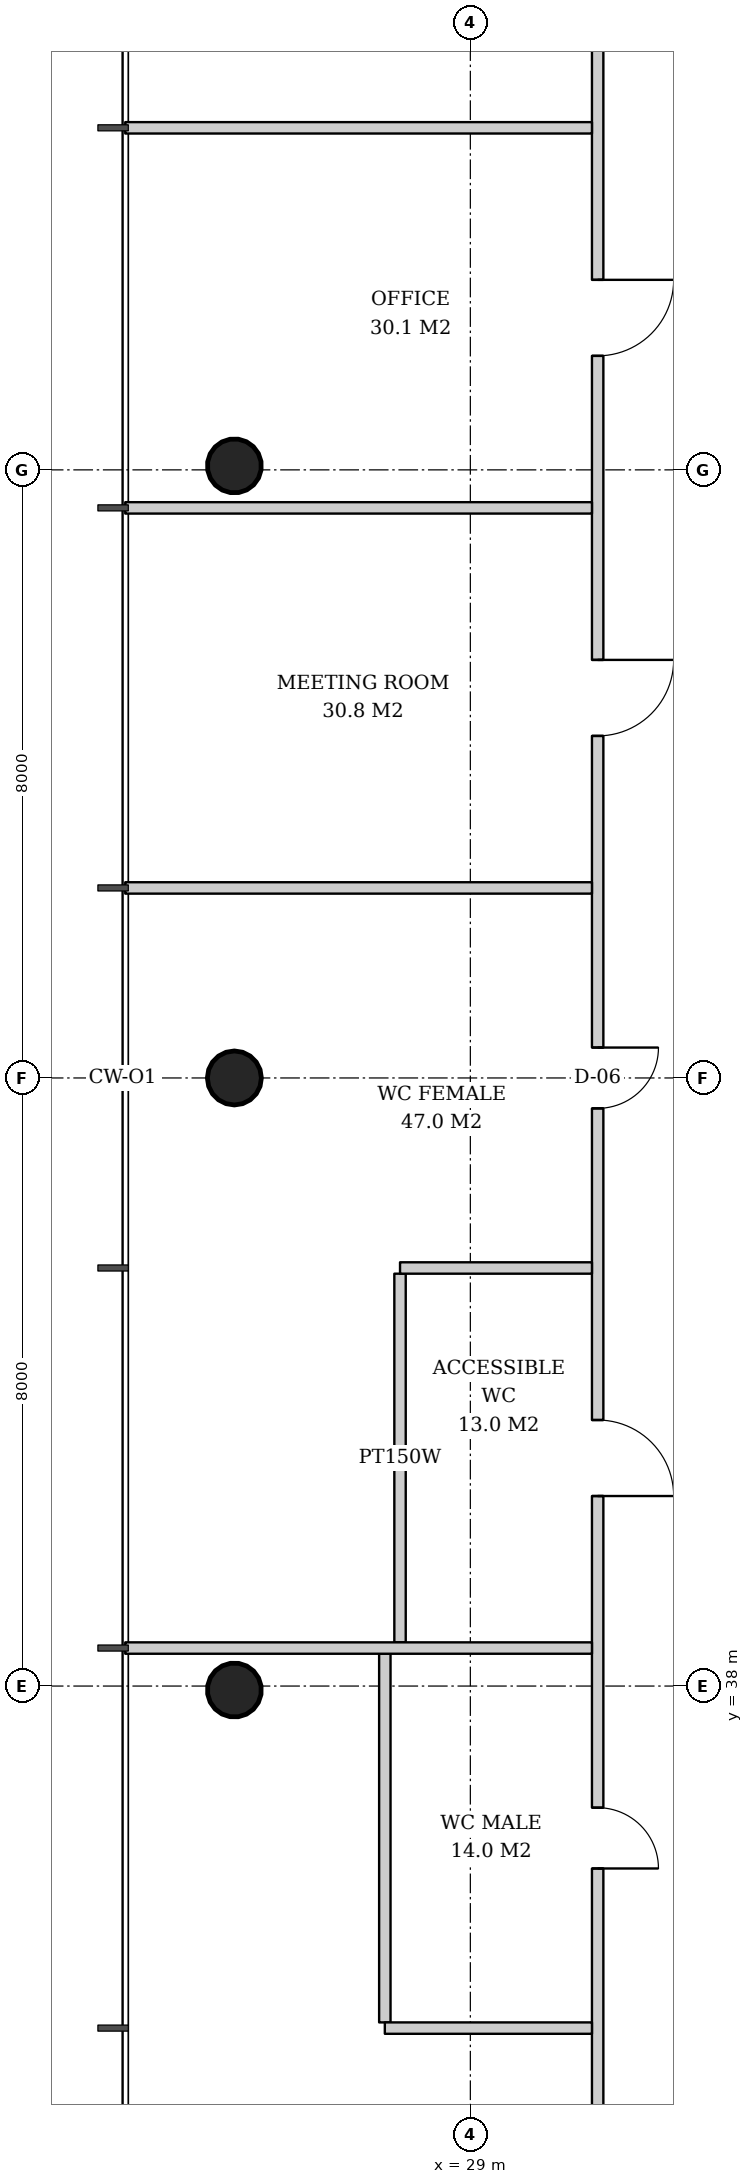
"""IFC4 building model, lengths in metres.
Left out: names, types, materials, properties, quantities, classifications, styles, units other than length and angle.
Written with IfcOpenShell. Run it as: python <this file> out.ifc"""

import sys

from ifc_helpers import new_model, si_unit, direction, frame, frame_2d, origin, origin_2d, place, context, subcontext, project, spatial, rectangle, hollow_circle, extrude, element, fill, save


model = new_model("IFC4")
c1 = context("Model", 3, precision=1e-05, world=origin(), true_north=direction((0.0, 1.0)))
c2 = subcontext(c1, "Body", "Model", "MODEL_VIEW")
j1 = project(units=[si_unit("LENGTHUNIT", "METRE"), si_unit("PLANEANGLEUNIT", "RADIAN")], contexts=[c1])
p1 = place(None, origin())
s1 = spatial("IfcSite", under=j1, at=p1, CompositionType="ELEMENT")
p2 = place(p1, origin())
s2 = spatial("IfcBuilding", under=s1, at=p2, CompositionType="ELEMENT")
p3 = place(p2, frame((0.0, 0.0, 173.0)))
s3 = spatial("IfcBuildingStorey", under=s2, at=p3, CompositionType="ELEMENT", Elevation=173.0)
p4 = place(p3, frame((25.857, 54.072, 0.0), z_axis=(0.031910269556, -0.015987237665, 0.999362868496), x_axis=(0.447933021895, 0.894067115991, 0.0)))
e1 = element("IfcColumn", 1, at=p4, inside=s3, PredefinedType="COLUMN", context=c2, shape_type="SweptSolid", body=[
    extrude(hollow_circle(Radius=0.355, WallThickness=0.025, at=origin_2d()), origin(), (0.0, 0.0, 1.0), 3.802),
])
p5 = place(p3, frame((25.857, 46.0, 0.0), z_axis=(0.031914348339, 0.0, 0.999490607445), x_axis=(0.0, 1.0, 0.0)))
e2 = element("IfcColumn", 2, at=p5, inside=s3, PredefinedType="COLUMN", context=c2, shape_type="SweptSolid", body=[
    extrude(hollow_circle(Radius=0.355, WallThickness=0.025, at=origin_2d()), origin(), (0.0, 0.0, 1.0), 3.802),
])
p6 = place(p3, frame((25.857, 37.928, 0.0), z_axis=(0.031910269556, 0.015987237665, 0.999362868496), x_axis=(-0.447933021895, 0.894067115991, 0.0)))
e3 = element("IfcColumn", 3, at=p6, inside=s3, PredefinedType="COLUMN", context=c2, shape_type="SweptSolid", body=[
    extrude(hollow_circle(Radius=0.355, WallThickness=0.025, at=origin_2d()), origin(), (0.0, 0.0, 1.0), 3.802),
])
for number, where, z_axis, x_axis in (
    (4, (28.075, 43.425, 0.0), (0.0, 0.0, 1.0), (0.0, -1.0, 0.0)),
    (5, (27.875, 38.425, 0.0), (0.0, 0.0, 1.0), (0.0, -1.0, 0.0)),
):
    element("IfcWall", number, at=place(p3, frame(where, z_axis=z_axis, x_axis=x_axis)), inside=s3, PredefinedType="PARTITIONING", context=c2, shape_type="SweptSolid", body=[
        extrude(rectangle(XDim=4.85, YDim=0.15, at=frame_2d((2.425, 0.0))), origin(), (0.0, 0.0, 1.0), 2.867),
    ])
p7 = place(p3, frame((30.675, 60.029, 0.0), z_axis=(0.0, 0.0, 1.0), x_axis=(0.0, -1.0, 0.0)))
e6 = element("IfcWall", 6, at=p7, inside=s3, PredefinedType="PARTITIONING", context=c2, shape_type="SweptSolid", body=[
    extrude(rectangle(XDim=28.057, YDim=0.15, at=frame_2d((14.029, 0.0))), origin(), (0.0, 0.0, 1.0), 2.867),
])
p8 = place(p7, frame((3.529, 0.0, 0.0)))
e7 = element("IfcOpeningElement", 7, at=p8, cuts=e6, PredefinedType="OPENING", context=c2, shape_type="SweptSolid", body=[
    extrude(rectangle(XDim=1.0, YDim=2.1, at=frame_2d((0.5, 1.05))), frame((0.0, 0.085, 0.0), z_axis=(0.0, -1.0, 0.0), x_axis=(1.0, 0.0, 0.0)), (0.0, 0.0, 1.0), 0.17),
])
p9 = place(p7, frame((8.529, 0.0, 0.0)))
e8 = element("IfcOpeningElement", 8, at=p9, cuts=e6, PredefinedType="OPENING", context=c2, shape_type="SweptSolid", body=[
    extrude(rectangle(XDim=1.0, YDim=2.1, at=frame_2d((0.5, 1.05))), frame((0.0, 0.085, 0.0), z_axis=(0.0, -1.0, 0.0), x_axis=(1.0, 0.0, 0.0)), (0.0, 0.0, 1.0), 0.17),
])
p10 = place(p7, frame((13.629, 0.0, 0.0)))
e9 = element("IfcOpeningElement", 9, at=p10, cuts=e6, PredefinedType="OPENING", context=c2, shape_type="SweptSolid", body=[
    extrude(rectangle(XDim=0.8, YDim=2.1, at=frame_2d((0.4, 1.05))), frame((0.0, 0.085, 0.0), z_axis=(0.0, -1.0, 0.0), x_axis=(1.0, 0.0, 0.0)), (0.0, 0.0, 1.0), 0.17),
])
p11 = place(p7, frame((18.529, 0.0, 0.0)))
e10 = element("IfcOpeningElement", 10, at=p11, cuts=e6, PredefinedType="OPENING", context=c2, shape_type="SweptSolid", body=[
    extrude(rectangle(XDim=1.0, YDim=2.1, at=frame_2d((0.5, 1.05))), frame((0.0, 0.085, 0.0), z_axis=(0.0, -1.0, 0.0), x_axis=(1.0, 0.0, 0.0)), (0.0, 0.0, 1.0), 0.17),
])
p12 = place(p7, frame((23.629, 0.0, 0.0)))
e11 = element("IfcOpeningElement", 11, at=p12, cuts=e6, PredefinedType="OPENING", context=c2, shape_type="SweptSolid", body=[
    extrude(rectangle(XDim=0.8, YDim=2.1, at=frame_2d((0.4, 1.05))), frame((0.0, 0.085, 0.0), z_axis=(0.0, -1.0, 0.0), x_axis=(1.0, 0.0, 0.0)), (0.0, 0.0, 1.0), 0.17),
])
for number, where, z_axis, x_axis in (
    (12, (30.6, 58.5, 0.0), (0.0, 0.0, 1.0), (-1.0, 0.0, 0.0)),
    (13, (30.6, 53.5, 0.0), (0.0, 0.0, 1.0), (-1.0, 0.0, 0.0)),
    (14, (30.6, 48.5, 0.0), (0.0, 0.0, 1.0), (-1.0, 0.0, 0.0)),
):
    element("IfcWall", number, at=place(p3, frame(where, z_axis=z_axis, x_axis=x_axis)), inside=s3, PredefinedType="PARTITIONING", context=c2, shape_type="SweptSolid", body=[
        extrude(rectangle(XDim=6.14, YDim=0.15, at=frame_2d((3.07, 0.0))), origin(), (0.0, 0.0, 1.0), 3.12),
    ])
p13 = place(p3, frame((30.6, 43.5, 0.0), z_axis=(0.0, 0.0, 1.0), x_axis=(-1.0, 0.0, 0.0)))
e15 = element("IfcWall", 15, at=p13, inside=s3, PredefinedType="PARTITIONING", context=c2, shape_type="SweptSolid", body=[
    extrude(rectangle(XDim=2.525, YDim=0.15, at=frame_2d((1.263, 0.0))), origin(), (0.0, 0.0, 1.0), 2.867),
])
p14 = place(p3, frame((30.6, 38.5, 0.0), z_axis=(0.0, 0.0, 1.0), x_axis=(-1.0, 0.0, 0.0)))
e16 = element("IfcWall", 16, at=p14, inside=s3, PredefinedType="PARTITIONING", context=c2, shape_type="SweptSolid", body=[
    extrude(rectangle(XDim=6.14, YDim=0.15, at=frame_2d((3.07, 0.0))), origin(), (0.0, 0.0, 1.0), 3.12),
])
p15 = place(p3, frame((30.6, 33.5, 0.0), z_axis=(0.0, 0.0, 1.0), x_axis=(-1.0, 0.0, 0.0)))
e17 = element("IfcWall", 17, at=p15, inside=s3, PredefinedType="PARTITIONING", context=c2, shape_type="SweptSolid", body=[
    extrude(rectangle(XDim=2.725, YDim=0.15, at=frame_2d((1.363, 0.0))), origin(), (0.0, 0.0, 1.0), 3.62),
])
p16 = place(p8, origin())
e18 = element("IfcDoor", 18, at=p16, inside=s3, OperationType="SINGLE_SWING_LEFT", PredefinedType="DOOR", context=c2, shape_type="SweptSolid", body=[
    extrude(rectangle(XDim=1.0, YDim=2.1, at=frame_2d((0.5, 1.05))), frame((0.0, 0.025, 0.0), z_axis=(0.0, -1.0, 0.0), x_axis=(1.0, 0.0, 0.0)), (0.0, 0.0, 1.0), 0.05),
])
fill(e7, e18)
p17 = place(p9, origin())
e19 = element("IfcDoor", 19, at=p17, inside=s3, OperationType="SINGLE_SWING_LEFT", PredefinedType="DOOR", context=c2, shape_type="SweptSolid", body=[
    extrude(rectangle(XDim=1.0, YDim=2.1, at=frame_2d((0.5, 1.05))), frame((0.0, 0.025, 0.0), z_axis=(0.0, -1.0, 0.0), x_axis=(1.0, 0.0, 0.0)), (0.0, 0.0, 1.0), 0.05),
])
fill(e8, e19)
p18 = place(p10, origin())
e20 = element("IfcDoor", 20, at=p18, inside=s3, OperationType="SINGLE_SWING_LEFT", PredefinedType="DOOR", context=c2, shape_type="SweptSolid", body=[
    extrude(rectangle(XDim=0.8, YDim=2.1, at=frame_2d((0.4, 1.05))), frame((0.0, 0.025, 0.0), z_axis=(0.0, -1.0, 0.0), x_axis=(1.0, 0.0, 0.0)), (0.0, 0.0, 1.0), 0.05),
])
fill(e9, e20)
p19 = place(p11, origin())
e21 = element("IfcDoor", 21, at=p19, inside=s3, OperationType="SINGLE_SWING_RIGHT", PredefinedType="DOOR", context=c2, shape_type="SweptSolid", body=[
    extrude(rectangle(XDim=1.0, YDim=2.1, at=frame_2d((0.5, 1.05))), frame((0.0, 0.025, 0.0), z_axis=(0.0, -1.0, 0.0), x_axis=(1.0, 0.0, 0.0)), (0.0, 0.0, 1.0), 0.05),
])
fill(e10, e21)
p20 = place(p12, origin())
e22 = element("IfcDoor", 22, at=p20, inside=s3, OperationType="SINGLE_SWING_RIGHT", PredefinedType="DOOR", context=c2, shape_type="SweptSolid", body=[
    extrude(rectangle(XDim=0.8, YDim=2.1, at=frame_2d((0.4, 1.05))), frame((0.0, 0.025, 0.0), z_axis=(0.0, -1.0, 0.0), x_axis=(1.0, 0.0, 0.0)), (0.0, 0.0, 1.0), 0.05),
])
fill(e11, e22)
save(model, sys.argv[1])
